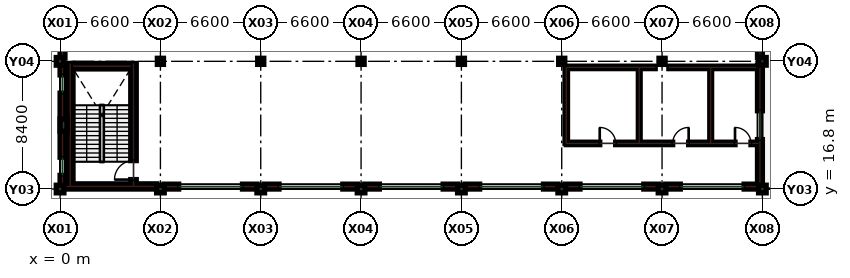
"""IFC4 building model, lengths in metres.
Left out: names, types, materials, properties, quantities, classifications, styles, units other than length and angle.
Written with IfcOpenShell. Run it as: python <this file> out.ifc"""

import sys

from ifc_helpers import new_model, si_unit, direction, frame, frame_2d, origin, origin_2d, place, context, subcontext, project, spatial, rectangle, extrude, element, fill, save


model = new_model("IFC4")
c1 = context("Model", 3, precision=1e-05, world=origin(), true_north=direction((0.0, 1.0)))
c2 = subcontext(c1, "Body", "Model", "MODEL_VIEW")
j1 = project(units=[si_unit("LENGTHUNIT", "METRE"), si_unit("PLANEANGLEUNIT", "RADIAN")], contexts=[c1])
p1 = place(None, origin())
s1 = spatial("IfcSite", under=j1, at=p1, CompositionType="ELEMENT")
p2 = place(p1, origin())
s2 = spatial("IfcBuilding", under=s1, at=p2, CompositionType="ELEMENT")
p3 = place(p2, frame((0.0, 0.0, 5.4)))
s3 = spatial("IfcBuildingStorey", under=s2, at=p3, CompositionType="ELEMENT", Elevation=5.4)
for number, where, z_axis, x_axis in (
    (1, (0.0, 16.8, 0.0), (0.0, 0.0, 1.0), (1.0, 0.0, 0.0)),
    (2, (0.0, 25.2, 0.0), (0.0, 0.0, 1.0), (1.0, 0.0, 0.0)),
    (3, (6.6, 16.8, 0.0), (0.0, 0.0, 1.0), (1.0, 0.0, 0.0)),
):
    element("IfcColumn", number, at=place(p3, frame(where, z_axis=z_axis, x_axis=x_axis)), inside=s3, PredefinedType="COLUMN", context=c2, shape_type="SweptSolid", body=[
        extrude(rectangle(XDim=0.5, YDim=0.5, at=origin_2d()), origin(), (0.0, 0.0, 1.0), 4.5),
    ])
p4 = place(p3, frame((6.6, 25.2, 0.0), z_axis=(0.0, 0.0, 1.0), x_axis=(1.0, 0.0, 0.0)))
e4 = element("IfcColumn", 4, at=p4, inside=s3, PredefinedType="COLUMN", context=c2, shape_type="SweptSolid", body=[
    extrude(rectangle(XDim=0.4, YDim=0.4, at=origin_2d()), origin(), (0.0, 0.0, 1.0), 4.5),
])
p5 = place(p3, frame((13.2, 16.8, 0.0), z_axis=(0.0, 0.0, 1.0), x_axis=(1.0, 0.0, 0.0)))
e5 = element("IfcColumn", 5, at=p5, inside=s3, PredefinedType="COLUMN", context=c2, shape_type="SweptSolid", body=[
    extrude(rectangle(XDim=0.5, YDim=0.5, at=origin_2d()), origin(), (0.0, 0.0, 1.0), 4.5),
])
p6 = place(p3, frame((13.2, 25.2, 0.0), z_axis=(0.0, 0.0, 1.0), x_axis=(1.0, 0.0, 0.0)))
e6 = element("IfcColumn", 6, at=p6, inside=s3, PredefinedType="COLUMN", context=c2, shape_type="SweptSolid", body=[
    extrude(rectangle(XDim=0.4, YDim=0.4, at=origin_2d()), origin(), (0.0, 0.0, 1.0), 4.5),
])
p7 = place(p3, frame((19.8, 16.8, 0.0), z_axis=(0.0, 0.0, 1.0), x_axis=(1.0, 0.0, 0.0)))
e7 = element("IfcColumn", 7, at=p7, inside=s3, PredefinedType="COLUMN", context=c2, shape_type="SweptSolid", body=[
    extrude(rectangle(XDim=0.5, YDim=0.5, at=origin_2d()), origin(), (0.0, 0.0, 1.0), 4.5),
])
p8 = place(p3, frame((19.8, 25.2, 0.0), z_axis=(0.0, 0.0, 1.0), x_axis=(1.0, 0.0, 0.0)))
e8 = element("IfcColumn", 8, at=p8, inside=s3, PredefinedType="COLUMN", context=c2, shape_type="SweptSolid", body=[
    extrude(rectangle(XDim=0.4, YDim=0.4, at=origin_2d()), origin(), (0.0, 0.0, 1.0), 4.5),
])
p9 = place(p3, frame((26.4, 16.8, 0.0), z_axis=(0.0, 0.0, 1.0), x_axis=(1.0, 0.0, 0.0)))
e9 = element("IfcColumn", 9, at=p9, inside=s3, PredefinedType="COLUMN", context=c2, shape_type="SweptSolid", body=[
    extrude(rectangle(XDim=0.5, YDim=0.5, at=origin_2d()), origin(), (0.0, 0.0, 1.0), 4.5),
])
p10 = place(p3, frame((26.4, 25.2, 0.0), z_axis=(0.0, 0.0, 1.0), x_axis=(1.0, 0.0, 0.0)))
e10 = element("IfcColumn", 10, at=p10, inside=s3, PredefinedType="COLUMN", context=c2, shape_type="SweptSolid", body=[
    extrude(rectangle(XDim=0.4, YDim=0.4, at=origin_2d()), origin(), (0.0, 0.0, 1.0), 4.5),
])
p11 = place(p3, frame((33.0, 16.8, 0.0), z_axis=(0.0, 0.0, 1.0), x_axis=(1.0, 0.0, 0.0)))
e11 = element("IfcColumn", 11, at=p11, inside=s3, PredefinedType="COLUMN", context=c2, shape_type="SweptSolid", body=[
    extrude(rectangle(XDim=0.5, YDim=0.5, at=origin_2d()), origin(), (0.0, 0.0, 1.0), 4.5),
])
p12 = place(p3, frame((33.0, 25.2, 0.0), z_axis=(0.0, 0.0, 1.0), x_axis=(1.0, 0.0, 0.0)))
e12 = element("IfcColumn", 12, at=p12, inside=s3, PredefinedType="COLUMN", context=c2, shape_type="SweptSolid", body=[
    extrude(rectangle(XDim=0.4, YDim=0.4, at=origin_2d()), origin(), (0.0, 0.0, 1.0), 4.5),
])
p13 = place(p3, frame((39.6, 16.8, 0.0), z_axis=(0.0, 0.0, 1.0), x_axis=(1.0, 0.0, 0.0)))
e13 = element("IfcColumn", 13, at=p13, inside=s3, PredefinedType="COLUMN", context=c2, shape_type="SweptSolid", body=[
    extrude(rectangle(XDim=0.5, YDim=0.5, at=origin_2d()), origin(), (0.0, 0.0, 1.0), 4.5),
])
p14 = place(p3, frame((39.6, 25.2, 0.0), z_axis=(0.0, 0.0, 1.0), x_axis=(1.0, 0.0, 0.0)))
e14 = element("IfcColumn", 14, at=p14, inside=s3, PredefinedType="COLUMN", context=c2, shape_type="SweptSolid", body=[
    extrude(rectangle(XDim=0.4, YDim=0.4, at=origin_2d()), origin(), (0.0, 0.0, 1.0), 4.5),
])
for number, where, z_axis, x_axis in (
    (15, (46.2, 16.8, 0.0), (0.0, 0.0, 1.0), (1.0, 0.0, 0.0)),
    (16, (46.2, 25.2, 0.0), (0.0, 0.0, 1.0), (1.0, 0.0, 0.0)),
):
    element("IfcColumn", number, at=place(p3, frame(where, z_axis=z_axis, x_axis=x_axis)), inside=s3, PredefinedType="COLUMN", context=c2, shape_type="SweptSolid", body=[
        extrude(rectangle(XDim=0.5, YDim=0.5, at=origin_2d()), origin(), (0.0, 0.0, 1.0), 4.5),
    ])
p15 = place(p3, frame((0.225, 21.0, 0.0), z_axis=(0.0, 0.0, 1.0), x_axis=(1.0, 0.0, 0.0)))
e17 = element("IfcColumn", 17, at=p15, inside=s3, PredefinedType="PILASTER", context=c2, shape_type="SweptSolid", body=[
    extrude(rectangle(XDim=0.45, YDim=0.8, at=origin_2d()), origin(), (0.0, 0.0, 1.0), 4.5),
])
p16 = place(p3, frame((33.3, 19.8, 0.0), z_axis=(0.0, 0.0, 1.0), x_axis=(1.0, 0.0, 0.0)))
e18 = element("IfcWall", 18, at=p16, inside=s3, PredefinedType="PARTITIONING", context=c2, shape_type="SweptSolid", body=[
    extrude(rectangle(XDim=12.65, YDim=0.16, at=frame_2d((6.325, 0.0))), origin(), (0.0, 0.0, 1.0), 3.45),
])
p17 = place(p16, frame((2.2, 0.0, 0.0)))
e19 = element("IfcOpeningElement", 19, at=p17, cuts=e18, PredefinedType="OPENING", context=c2, shape_type="SweptSolid", body=[
    extrude(rectangle(XDim=1.05, YDim=2.15, at=frame_2d((0.525, 1.075))), frame((0.0, 0.09, 0.0), z_axis=(0.0, -1.0, 0.0), x_axis=(1.0, 0.0, 0.0)), (0.0, 0.0, 1.0), 0.18),
])
p18 = place(p16, frame((7.0, 0.0, 0.0)))
e20 = element("IfcOpeningElement", 20, at=p18, cuts=e18, PredefinedType="OPENING", context=c2, shape_type="SweptSolid", body=[
    extrude(rectangle(XDim=1.05, YDim=2.15, at=frame_2d((0.525, 1.075))), frame((0.0, 0.09, 0.0), z_axis=(0.0, -1.0, 0.0), x_axis=(1.0, 0.0, 0.0)), (0.0, 0.0, 1.0), 0.18),
])
p19 = place(p16, frame((11.1, 0.0, 0.0)))
e21 = element("IfcOpeningElement", 21, at=p19, cuts=e18, PredefinedType="OPENING", context=c2, shape_type="SweptSolid", body=[
    extrude(rectangle(XDim=1.05, YDim=2.15, at=frame_2d((0.525, 1.075))), frame((0.0, 0.09, 0.0), z_axis=(0.0, -1.0, 0.0), x_axis=(1.0, 0.0, 0.0)), (0.0, 0.0, 1.0), 0.18),
])
p20 = place(p3, frame((33.3, 24.8, 0.0), z_axis=(0.0, 0.0, 1.0), x_axis=(1.0, 0.0, 0.0)))
e22 = element("IfcWall", 22, at=p20, inside=s3, PredefinedType="PARTITIONING", context=c2, shape_type="SweptSolid", body=[
    extrude(rectangle(XDim=5.85, YDim=0.16, at=frame_2d((2.925, 0.0))), origin(), (0.0, 0.0, 1.0), 3.45),
])
p21 = place(p3, frame((40.05, 24.8, 0.0), z_axis=(0.0, 0.0, 1.0), x_axis=(1.0, 0.0, 0.0)))
e23 = element("IfcWall", 23, at=p21, inside=s3, PredefinedType="PARTITIONING", context=c2, shape_type="SweptSolid", body=[
    extrude(rectangle(XDim=5.9, YDim=0.16, at=frame_2d((2.95, 0.0))), origin(), (0.0, 0.0, 1.0), 3.45),
])
p22 = place(p3, frame((33.3, 19.8, 0.0), z_axis=(0.0, 0.0, 1.0), x_axis=(0.0, 1.0, 0.0)))
e24 = element("IfcWall", 24, at=p22, inside=s3, PredefinedType="PARTITIONING", context=c2, shape_type="SweptSolid", body=[
    extrude(rectangle(XDim=5.0, YDim=0.16, at=frame_2d((2.5, 0.0))), origin(), (0.0, 0.0, 1.0), 3.45),
])
for number, where, z_axis, x_axis in (
    (25, (38.1, 19.8, 0.0), (0.0, 0.0, 1.0), (0.0, 1.0, 0.0)),
    (26, (42.8, 19.8, 0.0), (0.0, 0.0, 1.0), (0.0, 1.0, 0.0)),
):
    element("IfcWall", number, at=place(p3, frame(where, z_axis=z_axis, x_axis=x_axis)), inside=s3, PredefinedType="PARTITIONING", context=c2, shape_type="SweptSolid", body=[
        extrude(rectangle(XDim=5.0, YDim=0.12, at=frame_2d((2.5, 0.0))), origin(), (0.0, 0.0, 1.0), 3.45),
    ])
p23 = place(p3, frame((0.245, 16.97, 0.0), z_axis=(0.0, 0.0, 1.0), x_axis=(1.0, 0.0, 0.0)))
e27 = element("IfcWall", 27, at=p23, inside=s3, PredefinedType="SHEAR", context=c2, shape_type="SweptSolid", body=[
    extrude(rectangle(XDim=6.11, YDim=0.34, at=frame_2d((3.055, 0.0))), origin(), (0.0, 0.0, 1.0), 4.2),
])
p24 = place(p3, frame((0.16, 24.955, 0.0), z_axis=(0.0, 0.0, 1.0), x_axis=(0.0, -1.0, 0.0)))
e28 = element("IfcWall", 28, at=p24, inside=s3, PredefinedType="SOLIDWALL", context=c2, shape_type="SweptSolid", body=[
    extrude(rectangle(XDim=7.91, YDim=0.32, at=frame_2d((3.955, 0.0))), origin(), (0.0, 0.0, 1.0), 3.485),
])
p25 = place(p24, frame((0.65, 0.0, 0.95)))
e29 = element("IfcOpeningElement", 29, at=p25, cuts=e28, PredefinedType="OPENING", context=c2, shape_type="SweptSolid", body=[
    extrude(rectangle(XDim=1.2, YDim=1.5, at=frame_2d((0.6, 0.75))), frame((0.0, 0.17, 0.0), z_axis=(0.0, -1.0, 0.0), x_axis=(1.0, 0.0, 0.0)), (0.0, 0.0, 1.0), 0.34),
])
p26 = place(p24, frame((6.06, 0.0, 0.95)))
e30 = element("IfcOpeningElement", 30, at=p26, cuts=e28, PredefinedType="OPENING", context=c2, shape_type="SweptSolid", body=[
    extrude(rectangle(XDim=1.2, YDim=1.5, at=frame_2d((0.6, 0.75))), frame((0.0, 0.17, 0.0), z_axis=(0.0, -1.0, 0.0), x_axis=(1.0, 0.0, 0.0)), (0.0, 0.0, 1.0), 0.34),
])
p27 = place(p3, frame((0.16, 33.355, 0.0), z_axis=(0.0, 0.0, 1.0), x_axis=(0.0, -1.0, 0.0)))
e31 = element("IfcWall", 31, at=p27, inside=s3, PredefinedType="SOLIDWALL", context=c2, shape_type="SweptSolid", body=[
    extrude(rectangle(XDim=7.91, YDim=0.32, at=frame_2d((3.955, 0.0))), origin(), (0.0, 0.0, 1.0), 3.635),
])
p28 = place(p27, frame((1.855, 0.0, 1.45)))
e32 = element("IfcOpeningElement", 32, at=p28, cuts=e31, PredefinedType="OPENING", context=c2, shape_type="SweptSolid", body=[
    extrude(rectangle(XDim=4.2, YDim=1.1, at=frame_2d((2.1, 0.55))), frame((0.0, 0.17, 0.0), z_axis=(0.0, -1.0, 0.0), x_axis=(1.0, 0.0, 0.0)), (0.0, 0.0, 1.0), 0.34),
])
p29 = place(p3, frame((6.845, 16.96, 0.0), z_axis=(0.0, 0.0, 1.0), x_axis=(1.0, 0.0, 0.0)))
e33 = element("IfcWall", 33, at=p29, inside=s3, PredefinedType="SOLIDWALL", context=c2, shape_type="SweptSolid", body=[
    extrude(rectangle(XDim=6.11, YDim=0.32, at=frame_2d((3.055, 0.0))), origin(), (0.0, 0.0, 1.0), 3.585),
])
p30 = place(p29, frame((0.955, 0.0, 1.45)))
e34 = element("IfcOpeningElement", 34, at=p30, cuts=e33, PredefinedType="OPENING", context=c2, shape_type="SweptSolid", body=[
    extrude(rectangle(XDim=4.2, YDim=1.1, at=frame_2d((2.1, 0.55))), frame((0.0, 0.17, 0.0), z_axis=(0.0, -1.0, 0.0), x_axis=(1.0, 0.0, 0.0)), (0.0, 0.0, 1.0), 0.34),
])
p31 = place(p3, frame((13.445, 16.96, 0.0), z_axis=(0.0, 0.0, 1.0), x_axis=(1.0, 0.0, 0.0)))
e35 = element("IfcWall", 35, at=p31, inside=s3, PredefinedType="SOLIDWALL", context=c2, shape_type="SweptSolid", body=[
    extrude(rectangle(XDim=6.11, YDim=0.32, at=frame_2d((3.055, 0.0))), origin(), (0.0, 0.0, 1.0), 3.585),
])
p32 = place(p31, frame((0.955, 0.0, 1.45)))
e36 = element("IfcOpeningElement", 36, at=p32, cuts=e35, PredefinedType="OPENING", context=c2, shape_type="SweptSolid", body=[
    extrude(rectangle(XDim=4.2, YDim=1.1, at=frame_2d((2.1, 0.55))), frame((0.0, 0.17, 0.0), z_axis=(0.0, -1.0, 0.0), x_axis=(1.0, 0.0, 0.0)), (0.0, 0.0, 1.0), 0.34),
])
p33 = place(p3, frame((20.045, 16.96, 0.0), z_axis=(0.0, 0.0, 1.0), x_axis=(1.0, 0.0, 0.0)))
e37 = element("IfcWall", 37, at=p33, inside=s3, PredefinedType="SOLIDWALL", context=c2, shape_type="SweptSolid", body=[
    extrude(rectangle(XDim=6.11, YDim=0.32, at=frame_2d((3.055, 0.0))), origin(), (0.0, 0.0, 1.0), 3.585),
])
p34 = place(p33, frame((0.955, 0.0, 1.45)))
e38 = element("IfcOpeningElement", 38, at=p34, cuts=e37, PredefinedType="OPENING", context=c2, shape_type="SweptSolid", body=[
    extrude(rectangle(XDim=4.2, YDim=1.1, at=frame_2d((2.1, 0.55))), frame((0.0, 0.17, 0.0), z_axis=(0.0, -1.0, 0.0), x_axis=(1.0, 0.0, 0.0)), (0.0, 0.0, 1.0), 0.34),
])
p35 = place(p3, frame((26.645, 16.96, 0.0), z_axis=(0.0, 0.0, 1.0), x_axis=(1.0, 0.0, 0.0)))
e39 = element("IfcWall", 39, at=p35, inside=s3, PredefinedType="SOLIDWALL", context=c2, shape_type="SweptSolid", body=[
    extrude(rectangle(XDim=6.11, YDim=0.32, at=frame_2d((3.055, 0.0))), origin(), (0.0, 0.0, 1.0), 3.585),
])
p36 = place(p35, frame((0.955, 0.0, 1.45)))
e40 = element("IfcOpeningElement", 40, at=p36, cuts=e39, PredefinedType="OPENING", context=c2, shape_type="SweptSolid", body=[
    extrude(rectangle(XDim=4.2, YDim=1.1, at=frame_2d((2.1, 0.55))), frame((0.0, 0.17, 0.0), z_axis=(0.0, -1.0, 0.0), x_axis=(1.0, 0.0, 0.0)), (0.0, 0.0, 1.0), 0.34),
])
p37 = place(p3, frame((33.245, 16.96, 0.0), z_axis=(0.0, 0.0, 1.0), x_axis=(1.0, 0.0, 0.0)))
e41 = element("IfcWall", 41, at=p37, inside=s3, PredefinedType="SOLIDWALL", context=c2, shape_type="SweptSolid", body=[
    extrude(rectangle(XDim=6.11, YDim=0.32, at=frame_2d((3.055, 0.0))), origin(), (0.0, 0.0, 1.0), 3.585),
])
p38 = place(p37, frame((0.955, 0.0, 1.45)))
e42 = element("IfcOpeningElement", 42, at=p38, cuts=e41, PredefinedType="OPENING", context=c2, shape_type="SweptSolid", body=[
    extrude(rectangle(XDim=4.2, YDim=1.1, at=frame_2d((2.1, 0.55))), frame((0.0, 0.17, 0.0), z_axis=(0.0, -1.0, 0.0), x_axis=(1.0, 0.0, 0.0)), (0.0, 0.0, 1.0), 0.34),
])
p39 = place(p3, frame((39.845, 16.96, 0.0), z_axis=(0.0, 0.0, 1.0), x_axis=(1.0, 0.0, 0.0)))
e43 = element("IfcWall", 43, at=p39, inside=s3, PredefinedType="SOLIDWALL", context=c2, shape_type="SweptSolid", body=[
    extrude(rectangle(XDim=6.11, YDim=0.32, at=frame_2d((3.055, 0.0))), origin(), (0.0, 0.0, 1.0), 3.585),
])
p40 = place(p39, frame((0.955, 0.0, 1.45)))
e44 = element("IfcOpeningElement", 44, at=p40, cuts=e43, PredefinedType="OPENING", context=c2, shape_type="SweptSolid", body=[
    extrude(rectangle(XDim=4.2, YDim=1.1, at=frame_2d((2.1, 0.55))), frame((0.0, 0.17, 0.0), z_axis=(0.0, -1.0, 0.0), x_axis=(1.0, 0.0, 0.0)), (0.0, 0.0, 1.0), 0.34),
])
p41 = place(p3, frame((46.04, 17.045, 0.0), z_axis=(0.0, 0.0, 1.0), x_axis=(0.0, 1.0, 0.0)))
e45 = element("IfcWall", 45, at=p41, inside=s3, PredefinedType="SOLIDWALL", context=c2, shape_type="SweptSolid", body=[
    extrude(rectangle(XDim=7.91, YDim=0.32, at=frame_2d((3.955, 0.0))), origin(), (0.0, 0.0, 1.0), 3.485),
])
p42 = place(p41, frame((3.005, 0.0, 0.95)))
e46 = element("IfcOpeningElement", 46, at=p42, cuts=e45, PredefinedType="OPENING", context=c2, shape_type="SweptSolid", body=[
    extrude(rectangle(XDim=1.9, YDim=1.85, at=frame_2d((0.95, 0.925))), frame((0.0, 0.17, 0.0), z_axis=(0.0, -1.0, 0.0), x_axis=(1.0, 0.0, 0.0)), (0.0, 0.0, 1.0), 0.34),
])
p43 = place(p3, frame((46.04, 25.445, 0.0), z_axis=(0.0, 0.0, 1.0), x_axis=(0.0, 1.0, 0.0)))
e47 = element("IfcWall", 47, at=p43, inside=s3, PredefinedType="SOLIDWALL", context=c2, shape_type="SweptSolid", body=[
    extrude(rectangle(XDim=7.91, YDim=0.32, at=frame_2d((3.955, 0.0))), origin(), (0.0, 0.0, 1.0), 3.635),
])
p44 = place(p43, frame((3.405, 0.0, 0.0)))
e48 = element("IfcOpeningElement", 48, at=p44, cuts=e47, PredefinedType="OPENING", context=c2, shape_type="SweptSolid", body=[
    extrude(rectangle(XDim=1.1, YDim=2.2, at=frame_2d((0.55, 1.1))), frame((0.0, 0.17, 0.0), z_axis=(0.0, -1.0, 0.0), x_axis=(1.0, 0.0, 0.0)), (0.0, 0.0, 1.0), 0.34),
])
p45 = place(p3, frame((0.67, 16.97, 0.0), z_axis=(0.0, 0.0, 1.0), x_axis=(0.0, 1.0, 0.0)))
e49 = element("IfcWall", 49, at=p45, inside=s3, PredefinedType="SHEAR", context=c2, shape_type="SweptSolid", body=[
    extrude(rectangle(XDim=8.09, YDim=0.36, at=frame_2d((4.045, 0.0))), origin(), (0.0, 0.0, 1.0), 4.2),
])
p46 = place(p3, frame((4.83, 16.97, 0.0), z_axis=(0.0, 0.0, 1.0), x_axis=(0.0, 1.0, 0.0)))
e50 = element("IfcWall", 50, at=p46, inside=s3, PredefinedType="SHEAR", context=c2, shape_type="SweptSolid", body=[
    extrude(rectangle(XDim=8.09, YDim=0.36, at=frame_2d((4.045, 0.0))), origin(), (0.0, 0.0, 1.0), 4.2),
])
p47 = place(p46, frame((0.45, 0.0, 0.0)))
e51 = element("IfcOpeningElement", 51, at=p47, cuts=e50, PredefinedType="OPENING", context=c2, shape_type="SweptSolid", body=[
    extrude(rectangle(XDim=1.25, YDim=2.15, at=frame_2d((0.625, 1.075))), frame((0.0, 0.19, 0.0), z_axis=(0.0, -1.0, 0.0), x_axis=(1.0, 0.0, 0.0)), (0.0, 0.0, 1.0), 0.38),
])
p48 = place(p3, frame((0.85, 24.88, 0.0), z_axis=(0.0, 0.0, 1.0), x_axis=(1.0, 0.0, 0.0)))
e52 = element("IfcWall", 52, at=p48, inside=s3, PredefinedType="SHEAR", context=c2, shape_type="SweptSolid", body=[
    extrude(rectangle(XDim=3.8, YDim=0.36, at=frame_2d((1.9, 0.0))), origin(), (0.0, 0.0, 1.0), 4.2),
])
p49 = place(p17, origin())
e53 = element("IfcDoor", 53, at=p49, inside=s3, OperationType="SINGLE_SWING_LEFT", PredefinedType="DOOR", context=c2, shape_type="SweptSolid", body=[
    extrude(rectangle(XDim=1.05, YDim=2.15, at=frame_2d((0.525, 1.075))), frame((0.0, 0.025, 0.0), z_axis=(0.0, -1.0, 0.0), x_axis=(1.0, 0.0, 0.0)), (0.0, 0.0, 1.0), 0.05),
])
fill(e19, e53)
p50 = place(p18, origin())
e54 = element("IfcDoor", 54, at=p50, inside=s3, OperationType="SINGLE_SWING_RIGHT", PredefinedType="DOOR", context=c2, shape_type="SweptSolid", body=[
    extrude(rectangle(XDim=1.05, YDim=2.15, at=frame_2d((0.525, 1.075))), frame((0.0, 0.025, 0.0), z_axis=(0.0, -1.0, 0.0), x_axis=(1.0, 0.0, 0.0)), (0.0, 0.0, 1.0), 0.05),
])
fill(e20, e54)
p51 = place(p19, origin())
e55 = element("IfcDoor", 55, at=p51, inside=s3, OperationType="SINGLE_SWING_LEFT", PredefinedType="DOOR", context=c2, shape_type="SweptSolid", body=[
    extrude(rectangle(XDim=1.05, YDim=2.15, at=frame_2d((0.525, 1.075))), frame((0.0, 0.025, 0.0), z_axis=(0.0, -1.0, 0.0), x_axis=(1.0, 0.0, 0.0)), (0.0, 0.0, 1.0), 0.05),
])
fill(e21, e55)
p52 = place(p25, origin())
e56 = element("IfcWindow", 56, at=p52, inside=s3, PartitioningType="SINGLE_PANEL", PredefinedType="WINDOW", context=c2, shape_type="SweptSolid", body=[
    extrude(rectangle(XDim=1.2, YDim=1.5, at=frame_2d((0.6, 0.75))), frame((0.0, 0.03, 0.0), z_axis=(0.0, -1.0, 0.0), x_axis=(1.0, 0.0, 0.0)), (0.0, 0.0, 1.0), 0.06),
])
fill(e29, e56)
p53 = place(p26, origin())
e57 = element("IfcWindow", 57, at=p53, inside=s3, PartitioningType="SINGLE_PANEL", PredefinedType="WINDOW", context=c2, shape_type="SweptSolid", body=[
    extrude(rectangle(XDim=1.2, YDim=1.5, at=frame_2d((0.6, 0.75))), frame((0.0, 0.03, 0.0), z_axis=(0.0, -1.0, 0.0), x_axis=(1.0, 0.0, 0.0)), (0.0, 0.0, 1.0), 0.06),
])
fill(e30, e57)
p54 = place(p30, origin())
e58 = element("IfcWindow", 58, at=p54, inside=s3, PartitioningType="SINGLE_PANEL", PredefinedType="WINDOW", context=c2, shape_type="SweptSolid", body=[
    extrude(rectangle(XDim=4.2, YDim=1.1, at=frame_2d((2.1, 0.55))), frame((0.0, 0.03, 0.0), z_axis=(0.0, -1.0, 0.0), x_axis=(1.0, 0.0, 0.0)), (0.0, 0.0, 1.0), 0.06),
])
fill(e34, e58)
p55 = place(p32, origin())
e59 = element("IfcWindow", 59, at=p55, inside=s3, PartitioningType="SINGLE_PANEL", PredefinedType="WINDOW", context=c2, shape_type="SweptSolid", body=[
    extrude(rectangle(XDim=4.2, YDim=1.1, at=frame_2d((2.1, 0.55))), frame((0.0, 0.03, 0.0), z_axis=(0.0, -1.0, 0.0), x_axis=(1.0, 0.0, 0.0)), (0.0, 0.0, 1.0), 0.06),
])
fill(e36, e59)
p56 = place(p34, origin())
e60 = element("IfcWindow", 60, at=p56, inside=s3, PartitioningType="SINGLE_PANEL", PredefinedType="WINDOW", context=c2, shape_type="SweptSolid", body=[
    extrude(rectangle(XDim=4.2, YDim=1.1, at=frame_2d((2.1, 0.55))), frame((0.0, 0.03, 0.0), z_axis=(0.0, -1.0, 0.0), x_axis=(1.0, 0.0, 0.0)), (0.0, 0.0, 1.0), 0.06),
])
fill(e38, e60)
p57 = place(p36, origin())
e61 = element("IfcWindow", 61, at=p57, inside=s3, PartitioningType="SINGLE_PANEL", PredefinedType="WINDOW", context=c2, shape_type="SweptSolid", body=[
    extrude(rectangle(XDim=4.2, YDim=1.1, at=frame_2d((2.1, 0.55))), frame((0.0, 0.03, 0.0), z_axis=(0.0, -1.0, 0.0), x_axis=(1.0, 0.0, 0.0)), (0.0, 0.0, 1.0), 0.06),
])
fill(e40, e61)
p58 = place(p38, origin())
e62 = element("IfcWindow", 62, at=p58, inside=s3, PartitioningType="SINGLE_PANEL", PredefinedType="WINDOW", context=c2, shape_type="SweptSolid", body=[
    extrude(rectangle(XDim=4.2, YDim=1.1, at=frame_2d((2.1, 0.55))), frame((0.0, 0.03, 0.0), z_axis=(0.0, -1.0, 0.0), x_axis=(1.0, 0.0, 0.0)), (0.0, 0.0, 1.0), 0.06),
])
fill(e42, e62)
p59 = place(p40, origin())
e63 = element("IfcWindow", 63, at=p59, inside=s3, PartitioningType="SINGLE_PANEL", PredefinedType="WINDOW", context=c2, shape_type="SweptSolid", body=[
    extrude(rectangle(XDim=4.2, YDim=1.1, at=frame_2d((2.1, 0.55))), frame((0.0, 0.03, 0.0), z_axis=(0.0, -1.0, 0.0), x_axis=(1.0, 0.0, 0.0)), (0.0, 0.0, 1.0), 0.06),
])
fill(e44, e63)
p60 = place(p42, origin())
e64 = element("IfcWindow", 64, at=p60, inside=s3, PartitioningType="SINGLE_PANEL", PredefinedType="WINDOW", context=c2, shape_type="SweptSolid", body=[
    extrude(rectangle(XDim=1.9, YDim=1.85, at=frame_2d((0.95, 0.925))), frame((0.0, 0.03, 0.0), z_axis=(0.0, -1.0, 0.0), x_axis=(1.0, 0.0, 0.0)), (0.0, 0.0, 1.0), 0.06),
])
fill(e46, e64)
p61 = place(p47, origin())
e65 = element("IfcDoor", 65, at=p61, inside=s3, OperationType="SINGLE_SWING_LEFT", PredefinedType="DOOR", context=c2, shape_type="SweptSolid", body=[
    extrude(rectangle(XDim=1.25, YDim=2.15, at=frame_2d((0.625, 1.075))), frame((0.0, 0.025, 0.0), z_axis=(0.0, -1.0, 0.0), x_axis=(1.0, 0.0, 0.0)), (0.0, 0.0, 1.0), 0.05),
])
fill(e51, e65)
save(model, sys.argv[1])
